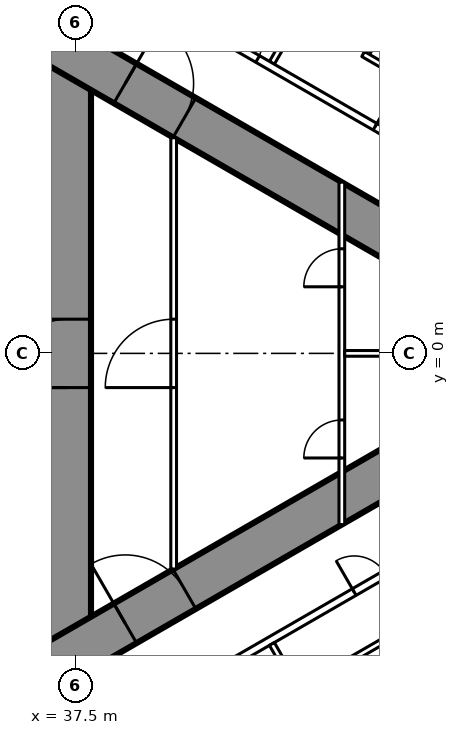
"""IFC4 building model, lengths in metres.
Left out: names, types, materials, properties, quantities, classifications, styles, units other than length and angle.
Written with IfcOpenShell. Run it as: python <this file> out.ifc"""

import sys

from ifc_helpers import new_model, si_unit, direction, frame, frame_2d, origin, place, context, subcontext, project, spatial, rectangle, extrude, element, fill, save


model = new_model("IFC4")
c1 = context("Model", 3, precision=1e-05, world=origin(), true_north=direction((0.0, 1.0)))
c2 = subcontext(c1, "Body", "Model", "MODEL_VIEW")
j1 = project(units=[si_unit("LENGTHUNIT", "METRE"), si_unit("PLANEANGLEUNIT", "RADIAN")], contexts=[c1])
p1 = place(None, origin())
s1 = spatial("IfcSite", under=j1, at=p1, CompositionType="ELEMENT")
p2 = place(p1, origin())
s2 = spatial("IfcBuilding", under=s1, at=p2, CompositionType="ELEMENT")
p3 = place(p2, frame((0.0, 0.0, 244.1)))
s3 = spatial("IfcBuildingStorey", under=s2, at=p3, CompositionType="ELEMENT", Elevation=244.1)
p4 = place(p3, frame((37.3, -8.6, 0.0), z_axis=(0.0, 0.0, 1.0), x_axis=(0.0, 1.0, 0.0)))
e1 = element("IfcWall", 1, at=p4, inside=s3, PredefinedType="SHEAR", context=c2, shape_type="SweptSolid", body=[
    extrude(rectangle(XDim=17.2, YDim=1.2, at=frame_2d((8.6, 0.0))), origin(), (0.0, 0.0, 1.0), 3.6),
])
p5 = place(p4, frame((7.7, 0.0, 0.0)))
e2 = element("IfcOpeningElement", 2, at=p5, cuts=e1, PredefinedType="OPENING", context=c2, shape_type="SweptSolid", body=[
    extrude(rectangle(XDim=1.8, YDim=2.2, at=frame_2d((0.9, 1.1))), frame((0.0, 0.61, 0.0), z_axis=(0.0, -1.0, 0.0), x_axis=(1.0, 0.0, 0.0)), (0.0, 0.0, 1.0), 1.22),
])
p6 = place(p3, frame((27.2, -13.8, 0.0), z_axis=(0.0, 0.0, 1.0), x_axis=(0.866027159892, 0.499996958321, 0.0)))
e3 = element("IfcWall", 3, at=p6, inside=s3, PredefinedType="SHEAR", context=c2, shape_type="SweptSolid", body=[
    extrude(rectangle(XDim=27.947, YDim=1.2, at=frame_2d((13.973, 0.0))), origin(), (0.0, 0.0, 1.0), 3.6),
])
p7 = place(p6, frame((4.6, 0.0, 0.0)))
e4 = element("IfcOpeningElement", 4, at=p7, cuts=e3, PredefinedType="OPENING", context=c2, shape_type="SweptSolid", body=[
    extrude(rectangle(XDim=1.0, YDim=2.2, at=frame_2d((0.5, 1.1))), frame((0.0, 0.61, 0.0), z_axis=(0.0, -1.0, 0.0), x_axis=(1.0, 0.0, 0.0)), (0.0, 0.0, 1.0), 1.22),
])
p8 = place(p6, frame((13.395, 0.0, 0.0)))
e5 = element("IfcOpeningElement", 5, at=p8, cuts=e3, PredefinedType="OPENING", context=c2, shape_type="SweptSolid", body=[
    extrude(rectangle(XDim=1.8, YDim=2.2, at=frame_2d((0.9, 1.1))), frame((0.0, 0.61, 0.0), z_axis=(0.0, -1.0, 0.0), x_axis=(1.0, 0.0, 0.0)), (0.0, 0.0, 1.0), 1.22),
])
p9 = place(p3, frame((27.2, 13.8, 0.0), z_axis=(0.0, 0.0, 1.0), x_axis=(0.866024515034, -0.500001539357, 0.0)))
e6 = element("IfcWall", 6, at=p9, inside=s3, PredefinedType="SHEAR", context=c2, shape_type="SweptSolid", body=[
    extrude(rectangle(XDim=26.907, YDim=1.2, at=frame_2d((13.454, 0.0))), origin(), (0.0, 0.0, 1.0), 3.6),
])
p10 = place(p9, frame((4.6, 0.0, 0.0)))
e7 = element("IfcOpeningElement", 7, at=p10, cuts=e6, PredefinedType="OPENING", context=c2, shape_type="SweptSolid", body=[
    extrude(rectangle(XDim=1.0, YDim=2.2, at=frame_2d((0.5, 1.1))), frame((0.0, 0.61, 0.0), z_axis=(0.0, -1.0, 0.0), x_axis=(1.0, 0.0, 0.0)), (0.0, 0.0, 1.0), 1.22),
])
p11 = place(p9, frame((13.395, 0.0, 0.0)))
e8 = element("IfcOpeningElement", 8, at=p11, cuts=e6, PredefinedType="OPENING", context=c2, shape_type="SweptSolid", body=[
    extrude(rectangle(XDim=1.8, YDim=2.2, at=frame_2d((0.9, 1.1))), frame((0.0, 0.61, 0.0), z_axis=(0.0, -1.0, 0.0), x_axis=(1.0, 0.0, 0.0)), (0.0, 0.0, 1.0), 1.22),
])
p12 = place(p3, frame((28.959, -15.44, 0.0), z_axis=(0.0, 0.0, 1.0), x_axis=(0.866025227435, 0.500000305447, 0.0)))
e9 = element("IfcWall", 9, at=p12, inside=s3, PredefinedType="PARTITIONING", context=c2, shape_type="SweptSolid", body=[
    extrude(rectangle(XDim=30.88, YDim=0.2, at=frame_2d((15.44, 0.0))), origin(), (0.0, 0.0, 1.0), 3.35),
])
p13 = place(p12, frame((1.494, 0.0, 0.0)))
e10 = element("IfcOpeningElement", 10, at=p13, cuts=e9, PredefinedType="OPENING", context=c2, shape_type="SweptSolid", body=[
    extrude(rectangle(XDim=1.8, YDim=2.04, at=frame_2d((0.9, 1.02))), frame((0.0, 0.11, 0.0), z_axis=(0.0, -1.0, 0.0), x_axis=(1.0, 0.0, 0.0)), (0.0, 0.0, 1.0), 0.22),
])
p14 = place(p12, frame((7.687, 0.0, 0.0)))
e11 = element("IfcOpeningElement", 11, at=p14, cuts=e9, PredefinedType="OPENING", context=c2, shape_type="SweptSolid", body=[
    extrude(rectangle(XDim=1.0, YDim=2.2, at=frame_2d((0.5, 1.1))), frame((0.0, 0.11, 0.0), z_axis=(0.0, -1.0, 0.0), x_axis=(1.0, 0.0, 0.0)), (0.0, 0.0, 1.0), 0.22),
])
p15 = place(p12, frame((18.321, 0.0, 0.0)))
e12 = element("IfcOpeningElement", 12, at=p15, cuts=e9, PredefinedType="OPENING", context=c2, shape_type="SweptSolid", body=[
    extrude(rectangle(XDim=0.95, YDim=2.2, at=frame_2d((0.475, 1.1))), frame((0.0, 0.11, 0.0), z_axis=(0.0, -1.0, 0.0), x_axis=(1.0, 0.0, 0.0)), (0.0, 0.0, 1.0), 0.22),
])
p16 = place(p12, frame((22.203, 0.0, 0.0)))
e13 = element("IfcOpeningElement", 13, at=p16, cuts=e9, PredefinedType="OPENING", context=c2, shape_type="SweptSolid", body=[
    extrude(rectangle(XDim=0.95, YDim=2.2, at=frame_2d((0.475, 1.1))), frame((0.0, 0.11, 0.0), z_axis=(0.0, -1.0, 0.0), x_axis=(1.0, 0.0, 0.0)), (0.0, 0.0, 1.0), 0.22),
])
p17 = place(p12, frame((26.192, 0.0, 0.0)))
e14 = element("IfcOpeningElement", 14, at=p17, cuts=e9, PredefinedType="OPENING", context=c2, shape_type="SweptSolid", body=[
    extrude(rectangle(XDim=1.8, YDim=2.2, at=frame_2d((0.9, 1.1))), frame((0.0, 0.11, 0.0), z_axis=(0.0, -1.0, 0.0), x_axis=(1.0, 0.0, 0.0)), (0.0, 0.0, 1.0), 0.22),
])
for number, where, z_axis, x_axis in (
    (15, (42.66, -7.646, 0.0), (0.0, 0.0, 1.0), (0.5, -0.866, 0.0)),
    (16, (42.66, 7.646, 0.0), (0.0, 0.0, 1.0), (0.5, 0.866, 0.0)),
):
    element("IfcWall", number, at=place(p3, frame(where, z_axis=z_axis, x_axis=x_axis)), inside=s3, PredefinedType="PARTITIONING", context=c2, shape_type="SweptSolid", body=[
        extrude(rectangle(XDim=6.398, YDim=0.15, at=frame_2d((3.199, 0.0))), origin(), (0.0, 0.0, 1.0), 2.45),
    ])
p18 = place(p3, frame((28.959, 15.44, 0.0), z_axis=(0.0, 0.0, 1.0), x_axis=(0.866028936079, -0.499993881836, 0.0)))
e17 = element("IfcWall", 17, at=p18, inside=s3, PredefinedType="PARTITIONING", context=c2, shape_type="SweptSolid", body=[
    extrude(rectangle(XDim=20.503, YDim=0.2, at=frame_2d((10.251, 0.0))), origin(), (0.0, 0.0, 1.0), 3.35),
])
p19 = place(p18, frame((18.953, 0.0, 0.0)))
e18 = element("IfcOpeningElement", 18, at=p19, cuts=e17, PredefinedType="OPENING", context=c2, shape_type="SweptSolid", body=[
    extrude(rectangle(XDim=0.95, YDim=2.2, at=frame_2d((0.475, 1.1))), frame((0.0, 0.11, 0.0), z_axis=(0.0, -1.0, 0.0), x_axis=(1.0, 0.0, 0.0)), (0.0, 0.0, 1.0), 0.22),
])
p20 = place(p18, frame((14.437, 0.0, 0.0)))
e19 = element("IfcOpeningElement", 19, at=p20, cuts=e17, PredefinedType="OPENING", context=c2, shape_type="SweptSolid", body=[
    extrude(rectangle(XDim=0.95, YDim=2.2, at=frame_2d((0.475, 1.1))), frame((0.0, 0.11, 0.0), z_axis=(0.0, -1.0, 0.0), x_axis=(1.0, 0.0, 0.0)), (0.0, 0.0, 1.0), 0.22),
])
p21 = place(p18, frame((2.244, 0.0, 0.0)))
e20 = element("IfcOpeningElement", 20, at=p21, cuts=e17, PredefinedType="OPENING", context=c2, shape_type="SweptSolid", body=[
    extrude(rectangle(XDim=1.8, YDim=2.04, at=frame_2d((0.9, 1.02))), frame((0.0, 0.11, 0.0), z_axis=(0.0, -1.0, 0.0), x_axis=(1.0, 0.0, 0.0)), (0.0, 0.0, 1.0), 0.22),
])
p22 = place(p3, frame((44.514, -8.191, 0.0), z_axis=(0.0, 0.0, 1.0), x_axis=(0.866031185235, 0.4999899861, 0.0)))
e21 = element("IfcWall", 21, at=p22, inside=s3, PredefinedType="PARTITIONING", context=c2, shape_type="SweptSolid", body=[
    extrude(rectangle(XDim=2.475, YDim=0.15, at=frame_2d((1.238, 0.0))), origin(), (0.0, 0.0, 1.0), 3.35),
])
p23 = place(p3, frame((45.127, 7.838, 0.0), z_axis=(0.0, 0.0, 1.0), x_axis=(0.500006934395, 0.866021400173, 0.0)))
e22 = element("IfcWall", 22, at=p23, inside=s3, PredefinedType="PARTITIONING", context=c2, shape_type="SweptSolid", body=[
    extrude(rectangle(XDim=2.6, YDim=0.15, at=frame_2d((1.3, 0.0))), origin(), (0.0, 0.0, 1.0), 3.35),
])
p24 = place(p23, frame((0.9, 0.0, 0.0)))
e23 = element("IfcOpeningElement", 23, at=p24, cuts=e22, PredefinedType="OPENING", context=c2, shape_type="SweptSolid", body=[
    extrude(rectangle(XDim=0.8, YDim=2.2, at=frame_2d((0.4, 1.1))), frame((0.0, 0.085, 0.0), z_axis=(0.0, -1.0, 0.0), x_axis=(1.0, 0.0, 0.0)), (0.0, 0.0, 1.0), 0.17),
])
p25 = place(p3, frame((45.062, 7.875, 0.0), z_axis=(0.0, 0.0, 1.0), x_axis=(0.866031185235, -0.4999899861, 0.0)))
e24 = element("IfcWall", 24, at=p25, inside=s3, PredefinedType="PARTITIONING", context=c2, shape_type="SweptSolid", body=[
    extrude(rectangle(XDim=2.475, YDim=0.15, at=frame_2d((1.238, 0.0))), origin(), (0.0, 0.0, 1.0), 2.5),
])
p26 = place(p3, frame((40.075, -5.674, 0.0), z_axis=(0.0, 0.0, 1.0), x_axis=(0.0, 1.0, 0.0)))
e25 = element("IfcWall", 25, at=p26, inside=s3, PredefinedType="PARTITIONING", context=c2, shape_type="SweptSolid", body=[
    extrude(rectangle(XDim=11.348, YDim=0.15, at=frame_2d((5.674, 0.0))), origin(), (0.0, 0.0, 1.0), 3.35),
])
p27 = place(p26, frame((4.774, 0.0, 0.0)))
e26 = element("IfcOpeningElement", 26, at=p27, cuts=e25, PredefinedType="OPENING", context=c2, shape_type="SweptSolid", body=[
    extrude(rectangle(XDim=1.8, YDim=2.2, at=frame_2d((0.9, 1.1))), frame((0.0, 0.085, 0.0), z_axis=(0.0, -1.0, 0.0), x_axis=(1.0, 0.0, 0.0)), (0.0, 0.0, 1.0), 0.17),
])
p28 = place(p3, frame((44.5, -4.505, 0.0), z_axis=(0.0, 0.0, 1.0), x_axis=(0.0, 1.0, 0.0)))
e27 = element("IfcWall", 27, at=p28, inside=s3, PredefinedType="PARTITIONING", context=c2, shape_type="SweptSolid", body=[
    extrude(rectangle(XDim=9.009, YDim=0.15, at=frame_2d((4.505, 0.0))), origin(), (0.0, 0.0, 1.0), 3.35),
])
p29 = place(p28, frame((1.752, 0.0, 0.0)))
e28 = element("IfcOpeningElement", 28, at=p29, cuts=e27, PredefinedType="OPENING", context=c2, shape_type="SweptSolid", body=[
    extrude(rectangle(XDim=1.0, YDim=2.2, at=frame_2d((0.5, 1.1))), frame((0.0, 0.085, 0.0), z_axis=(0.0, -1.0, 0.0), x_axis=(1.0, 0.0, 0.0)), (0.0, 0.0, 1.0), 0.17),
])
p30 = place(p28, frame((6.257, 0.0, 0.0)))
e29 = element("IfcOpeningElement", 29, at=p30, cuts=e27, PredefinedType="OPENING", context=c2, shape_type="SweptSolid", body=[
    extrude(rectangle(XDim=1.0, YDim=2.2, at=frame_2d((0.5, 1.1))), frame((0.0, 0.085, 0.0), z_axis=(0.0, -1.0, 0.0), x_axis=(1.0, 0.0, 0.0)), (0.0, 0.0, 1.0), 0.17),
])
p31 = place(p3, frame((44.575, 0.0, 0.0), z_axis=(0.0, 0.0, 1.0), x_axis=(1.0, 0.0, 0.0)))
e30 = element("IfcWall", 30, at=p31, inside=s3, PredefinedType="PARTITIONING", context=c2, shape_type="SweptSolid", body=[
    extrude(rectangle(XDim=7.727, YDim=0.15, at=frame_2d((3.864, 0.0))), origin(), (0.0, 0.0, 1.0), 2.45),
])
p32 = place(p15, origin())
e31 = element("IfcDoor", 31, at=p32, inside=s3, OperationType="SINGLE_SWING_LEFT", PredefinedType="DOOR", context=c2, shape_type="SweptSolid", body=[
    extrude(rectangle(XDim=0.95, YDim=2.2, at=frame_2d((0.475, 1.1))), frame((0.0, 0.025, 0.0), z_axis=(0.0, -1.0, 0.0), x_axis=(1.0, 0.0, 0.0)), (0.0, 0.0, 1.0), 0.05),
])
fill(e12, e31)
p33 = place(p19, origin())
e32 = element("IfcDoor", 32, at=p33, inside=s3, OperationType="SINGLE_SWING_LEFT", PredefinedType="DOOR", context=c2, shape_type="SweptSolid", body=[
    extrude(rectangle(XDim=0.95, YDim=2.2, at=frame_2d((0.475, 1.1))), frame((0.0, 0.025, 0.0), z_axis=(0.0, -1.0, 0.0), x_axis=(1.0, 0.0, 0.0)), (0.0, 0.0, 1.0), 0.05),
])
fill(e18, e32)
p34 = place(p20, origin())
e33 = element("IfcDoor", 33, at=p34, inside=s3, OperationType="SINGLE_SWING_LEFT", PredefinedType="DOOR", context=c2, shape_type="SweptSolid", body=[
    extrude(rectangle(XDim=0.95, YDim=2.2, at=frame_2d((0.475, 1.1))), frame((0.0, 0.025, 0.0), z_axis=(0.0, -1.0, 0.0), x_axis=(1.0, 0.0, 0.0)), (0.0, 0.0, 1.0), 0.05),
])
fill(e19, e33)
p35 = place(p27, origin())
e34 = element("IfcDoor", 34, at=p35, inside=s3, OperationType="DOUBLE_DOOR_SINGLE_SWING", PredefinedType="DOOR", context=c2, shape_type="SweptSolid", body=[
    extrude(rectangle(XDim=1.8, YDim=2.2, at=frame_2d((0.9, 1.1))), frame((0.0, 0.025, 0.0), z_axis=(0.0, -1.0, 0.0), x_axis=(1.0, 0.0, 0.0)), (0.0, 0.0, 1.0), 0.05),
])
fill(e26, e34)
p36 = place(p29, origin())
e35 = element("IfcDoor", 35, at=p36, inside=s3, OperationType="SINGLE_SWING_LEFT", PredefinedType="DOOR", context=c2, shape_type="SweptSolid", body=[
    extrude(rectangle(XDim=1.0, YDim=2.2, at=frame_2d((0.5, 1.1))), frame((0.0, 0.025, 0.0), z_axis=(0.0, -1.0, 0.0), x_axis=(1.0, 0.0, 0.0)), (0.0, 0.0, 1.0), 0.05),
])
fill(e28, e35)
p37 = place(p30, origin())
e36 = element("IfcDoor", 36, at=p37, inside=s3, OperationType="SINGLE_SWING_LEFT", PredefinedType="DOOR", context=c2, shape_type="SweptSolid", body=[
    extrude(rectangle(XDim=1.0, YDim=2.2, at=frame_2d((0.5, 1.1))), frame((0.0, 0.025, 0.0), z_axis=(0.0, -1.0, 0.0), x_axis=(1.0, 0.0, 0.0)), (0.0, 0.0, 1.0), 0.05),
])
fill(e29, e36)
p38 = place(p8, origin())
e37 = element("IfcDoor", 37, at=p38, inside=s3, OperationType="DOUBLE_DOOR_SINGLE_SWING", PredefinedType="DOOR", context=c2, shape_type="SweptSolid", body=[
    extrude(rectangle(XDim=1.8, YDim=2.2, at=frame_2d((0.9, 1.1))), frame((0.0, 0.025, 0.0), z_axis=(0.0, -1.0, 0.0), x_axis=(1.0, 0.0, 0.0)), (0.0, 0.0, 1.0), 0.05),
])
fill(e5, e37)
p39 = place(p11, origin())
e38 = element("IfcDoor", 38, at=p39, inside=s3, OperationType="DOUBLE_DOOR_SINGLE_SWING", PredefinedType="DOOR", context=c2, shape_type="SweptSolid", body=[
    extrude(rectangle(XDim=1.8, YDim=2.2, at=frame_2d((0.9, 1.1))), frame((0.0, 0.025, 0.0), z_axis=(0.0, -1.0, 0.0), x_axis=(1.0, 0.0, 0.0)), (0.0, 0.0, 1.0), 0.05),
])
fill(e8, e38)
p40 = place(p5, origin())
e39 = element("IfcDoor", 39, at=p40, inside=s3, OperationType="DOUBLE_DOOR_SINGLE_SWING", PredefinedType="DOOR", context=c2, shape_type="SweptSolid", body=[
    extrude(rectangle(XDim=1.8, YDim=2.2, at=frame_2d((0.9, 1.1))), frame((0.0, 0.025, 0.0), z_axis=(0.0, -1.0, 0.0), x_axis=(1.0, 0.0, 0.0)), (0.0, 0.0, 1.0), 0.05),
])
fill(e2, e39)
save(model, sys.argv[1])
